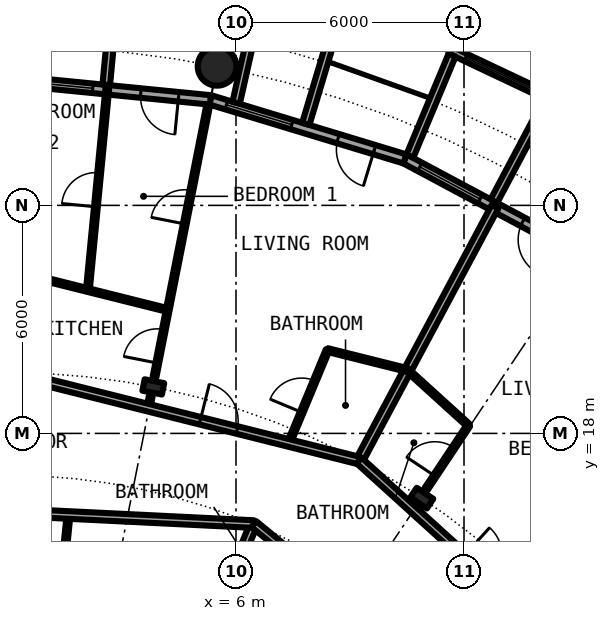
"""IFC4 building model, lengths in metres.
Left out: names, types, materials, properties, quantities, classifications, styles, units other than length and angle.
Written with IfcOpenShell. Run it as: python <this file> out.ifc"""

import sys

from ifc_helpers import new_model, si_unit, direction, frame, frame_2d, origin, origin_2d, place, context, subcontext, project, spatial, rectangle, circle, hollow_circle, i_section, extrude, element, fill, save


model = new_model("IFC4")
c1 = context("Model", 3, precision=1e-05, world=origin(), true_north=direction((0.0, 1.0)))
c2 = subcontext(c1, "Body", "Model", "MODEL_VIEW")
j1 = project(units=[si_unit("LENGTHUNIT", "METRE"), si_unit("PLANEANGLEUNIT", "RADIAN")], contexts=[c1])
p1 = place(None, origin())
s1 = spatial("IfcSite", under=j1, at=p1, CompositionType="ELEMENT")
p2 = place(p1, origin())
s2 = spatial("IfcBuilding", under=s1, at=p2, CompositionType="ELEMENT")
p3 = place(p2, frame((0.0, 0.0, 81.9)))
s3 = spatial("IfcBuildingStorey", under=s2, at=p3, CompositionType="ELEMENT", Elevation=81.9)
p4 = place(p3, frame((5.501, 27.658, 0.0), z_axis=(0.0, 0.0, 1.0), x_axis=(1.0, 0.0, 0.0)))
e1 = element("IfcColumn", 1, at=p4, inside=s3, PredefinedType="COLUMN", context=c2, shape_type="SweptSolid", body=[
    extrude(hollow_circle(Radius=0.508, WallThickness=0.04, at=origin_2d()), origin(), (0.0, 0.0, 1.0), 3.05),
])
for number, where, z_axis, x_axis in (
    (2, (10.889, 16.297, 0.0), (0.0, 0.0, 1.0), (0.556, 0.831, 0.0)),
    (3, (3.824, 19.223, 0.0), (0.0, 0.0, 1.0), (0.195, 0.981, 0.0)),
):
    element("IfcColumn", number, at=place(p3, frame(where, z_axis=z_axis, x_axis=x_axis)), inside=s3, PredefinedType="COLUMN", context=c2, shape_type="SweptSolid", body=[
        extrude(i_section(OverallWidth=0.306, OverallDepth=0.524, WebThickness=0.021, FlangeThickness=0.04, FilletRadius=0.027, at=origin_2d()), origin(), (0.0, 0.0, 1.0), 3.05),
    ])
p5 = place(p3, frame((15.167, 22.699, 0.0), z_axis=(0.0, 0.0, 1.0), x_axis=(-0.881915646801, 0.471407246368, 0.0)))
e4 = element("IfcWall", 4, at=p5, inside=s3, PredefinedType="SOLIDWALL", context=c2, shape_type="SweptSolid", body=[
    extrude(rectangle(XDim=5.352, YDim=0.25, at=frame_2d((2.676, 0.0))), origin(), (0.0, 0.0, 1.0), 2.7),
])
p6 = place(p5, frame((0.841, 0.0, 0.0)))
e5 = element("IfcOpeningElement", 5, at=p6, cuts=e4, PredefinedType="OPENING", context=c2, shape_type="SweptSolid", body=[
    extrude(rectangle(XDim=1.0, YDim=2.2, at=frame_2d((0.5, 1.1))), frame((0.0, 0.135, 0.0), z_axis=(0.0, -1.0, 0.0), x_axis=(1.0, 0.0, 0.0)), (0.0, 0.0, 1.0), 0.27),
])
p7 = place(p5, frame((3.111, 0.0, 0.3)))
e6 = element("IfcOpeningElement", 6, at=p7, cuts=e4, PredefinedType="OPENING", context=c2, shape_type="SweptSolid", body=[
    extrude(rectangle(XDim=1.8, YDim=2.1, at=frame_2d((0.9, 1.05))), frame((0.0, 0.135, 0.0), z_axis=(0.0, -1.0, 0.0), x_axis=(1.0, 0.0, 0.0)), (0.0, 0.0, 1.0), 0.27),
])
p8 = place(p3, frame((14.335, 26.808, -0.03), z_axis=(0.0, 0.0, 1.0), x_axis=(-0.904000060331, 0.427532327342, 0.0)))
e7 = element("IfcWall", 7, at=p8, inside=s3, PredefinedType="SOLIDWALL", context=c2, shape_type="SweptSolid", body=[
    extrude(rectangle(XDim=2.993, YDim=0.2, at=frame_2d((1.497, 0.0))), origin(), (0.0, 0.0, 1.0), 2.73),
])
p9 = place(p8, frame((0.457, 0.0, 0.33)))
e8 = element("IfcOpeningElement", 8, at=p9, cuts=e7, PredefinedType="OPENING", context=c2, shape_type="SweptSolid", body=[
    extrude(circle(Radius=1.04, at=frame_2d((1.04, 1.04))), frame((0.0, 0.11, 0.0), z_axis=(0.0, -1.0, 0.0), x_axis=(1.0, 0.0, 0.0)), (0.0, 0.0, 1.0), 0.22),
])
p10 = place(p3, frame((12.787, 24.113, -0.03), z_axis=(0.0, 0.0, 1.0), x_axis=(0.468365282436, 0.883534924159, 0.0)))
e9 = element("IfcWall", 9, at=p10, inside=s3, PredefinedType="SOLIDWALL", context=c2, shape_type="SweptSolid", body=[
    extrude(rectangle(XDim=3.006, YDim=0.2, at=frame_2d((1.503, 0.0))), origin(), (0.0, 0.0, 1.0), 2.73),
])
p11 = place(p3, frame((10.575, 25.295, -0.03), z_axis=(0.0, 0.0, 1.0), x_axis=(0.385697364644, 0.922625353492, 0.0)))
e10 = element("IfcWall", 10, at=p11, inside=s3, PredefinedType="SOLIDWALL", context=c2, shape_type="SweptSolid", body=[
    extrude(rectangle(XDim=2.883, YDim=0.2, at=frame_2d((1.442, 0.0))), origin(), (0.0, 0.0, 1.0), 2.73),
])
p12 = place(p3, frame((10.447, 25.222, 0.0), z_axis=(0.0, 0.0, 1.0), x_axis=(-0.956965678721, 0.290201119486, 0.0)))
e11 = element("IfcWall", 11, at=p12, inside=s3, PredefinedType="SOLIDWALL", context=c2, shape_type="SweptSolid", body=[
    extrude(rectangle(XDim=5.351, YDim=0.25, at=frame_2d((2.676, 0.0))), origin(), (0.0, 0.0, 1.0), 2.7),
])
p13 = place(p12, frame((0.841, 0.0, 0.0)))
e12 = element("IfcOpeningElement", 12, at=p13, cuts=e11, PredefinedType="OPENING", context=c2, shape_type="SweptSolid", body=[
    extrude(rectangle(XDim=1.0, YDim=2.2, at=frame_2d((0.5, 1.1))), frame((0.0, 0.135, 0.0), z_axis=(0.0, -1.0, 0.0), x_axis=(1.0, 0.0, 0.0)), (0.0, 0.0, 1.0), 0.27),
])
p14 = place(p12, frame((3.111, 0.0, 0.3)))
e13 = element("IfcOpeningElement", 13, at=p14, cuts=e11, PredefinedType="OPENING", context=c2, shape_type="SweptSolid", body=[
    extrude(rectangle(XDim=1.8, YDim=2.1, at=frame_2d((0.9, 1.05))), frame((0.0, 0.135, 0.0), z_axis=(0.0, -1.0, 0.0), x_axis=(1.0, 0.0, 0.0)), (0.0, 0.0, 1.0), 0.27),
])
p15 = place(p3, frame((7.837, 26.144, -0.03), z_axis=(0.0, 0.0, 1.0), x_axis=(0.287064767992, 0.957911174889, 0.0)))
e14 = element("IfcWall", 14, at=p15, inside=s3, PredefinedType="SOLIDWALL", context=c2, shape_type="SweptSolid", body=[
    extrude(rectangle(XDim=3.006, YDim=0.2, at=frame_2d((1.503, 0.0))), origin(), (0.0, 0.0, 1.0), 2.73),
])
p16 = place(p3, frame((6.004, 26.7, -0.03), z_axis=(0.0, 0.0, 1.0), x_axis=(0.219609259383, 0.975587911566, 0.0)))
e15 = element("IfcWall", 15, at=p16, inside=s3, PredefinedType="SOLIDWALL", context=c2, shape_type="SweptSolid", body=[
    extrude(rectangle(XDim=2.933, YDim=0.2, at=frame_2d((1.466, 0.0))), origin(), (0.0, 0.0, 1.0), 2.73),
])
p17 = place(p3, frame((5.326, 26.775, 0.0), z_axis=(0.0, 0.0, 1.0), x_axis=(-0.995173996315, 0.098126026407, 0.0)))
e16 = element("IfcWall", 16, at=p17, inside=s3, PredefinedType="SOLIDWALL", context=c2, shape_type="SweptSolid", body=[
    extrude(rectangle(XDim=5.352, YDim=0.25, at=frame_2d((2.676, 0.0))), origin(), (0.0, 0.0, 1.0), 2.7),
])
p18 = place(p17, frame((0.841, 0.0, 0.0)))
e17 = element("IfcOpeningElement", 17, at=p18, cuts=e16, PredefinedType="OPENING", context=c2, shape_type="SweptSolid", body=[
    extrude(rectangle(XDim=1.0, YDim=2.2, at=frame_2d((0.5, 1.1))), frame((0.0, 0.135, 0.0), z_axis=(0.0, -1.0, 0.0), x_axis=(1.0, 0.0, 0.0)), (0.0, 0.0, 1.0), 0.27),
])
p19 = place(p17, frame((3.111, 0.0, 0.3)))
e18 = element("IfcOpeningElement", 18, at=p19, cuts=e16, PredefinedType="OPENING", context=c2, shape_type="SweptSolid", body=[
    extrude(rectangle(XDim=1.8, YDim=2.1, at=frame_2d((0.9, 1.05))), frame((0.0, 0.135, 0.0), z_axis=(0.0, -1.0, 0.0), x_axis=(1.0, 0.0, 0.0)), (0.0, 0.0, 1.0), 0.27),
])
p20 = place(p3, frame((2.586, 27.171, -0.03), z_axis=(0.0, 0.0, 1.0), x_axis=(0.094548432284, 0.995520262954, 0.0)))
e19 = element("IfcWall", 19, at=p20, inside=s3, PredefinedType="SOLIDWALL", context=c2, shape_type="SweptSolid", body=[
    extrude(rectangle(XDim=3.006, YDim=0.2, at=frame_2d((1.503, 0.0))), origin(), (0.0, 0.0, 1.0), 2.73),
])
p21 = place(p3, frame((0.774, 7.681, 0.0), z_axis=(0.0, 0.0, 1.0), x_axis=(0.099730339513, 0.995014502096, 0.0)))
e20 = element("IfcWall", 20, at=p21, inside=s3, PredefinedType="PARTITIONING", context=c2, shape_type="SweptSolid", body=[
    extrude(rectangle(XDim=8.213, YDim=0.1, at=frame_2d((4.106, 0.0))), origin(), (0.0, 0.0, 1.0), 2.7),
])
p22 = place(p21, frame((6.49, 0.0, 0.0)))
e21 = element("IfcOpeningElement", 21, at=p22, cuts=e20, PredefinedType="OPENING", context=c2, shape_type="SweptSolid", body=[
    extrude(rectangle(XDim=0.9, YDim=2.3, at=frame_2d((0.45, 1.15))), frame((0.0, 0.06, 0.0), z_axis=(0.0, -1.0, 0.0), x_axis=(1.0, 0.0, 0.0)), (0.0, 0.0, 1.0), 0.12),
])
p23 = place(p21, frame((2.384, 0.0, 0.0)))
e22 = element("IfcOpeningElement", 22, at=p23, cuts=e20, PredefinedType="OPENING", context=c2, shape_type="SweptSolid", body=[
    extrude(rectangle(XDim=0.9, YDim=2.3, at=frame_2d((0.45, 1.15))), frame((0.0, 0.06, 0.0), z_axis=(0.0, -1.0, 0.0), x_axis=(1.0, 0.0, 0.0)), (0.0, 0.0, 1.0), 0.12),
])
p24 = place(p3, frame((2.102, 21.773, 0.0), z_axis=(0.0, 0.0, 1.0), x_axis=(0.096215269366, 0.995360548716, 0.0)))
e23 = element("IfcWall", 23, at=p24, inside=s3, PredefinedType="PARTITIONING", context=c2, shape_type="SweptSolid", body=[
    extrude(rectangle(XDim=5.301, YDim=0.1, at=frame_2d((2.65, 0.0))), origin(), (0.0, 0.0, 1.0), 2.7),
])
p25 = place(p24, frame((2.2, 0.0, 0.0)))
e24 = element("IfcOpeningElement", 24, at=p25, cuts=e23, PredefinedType="OPENING", context=c2, shape_type="SweptSolid", body=[
    extrude(rectangle(XDim=0.9, YDim=2.3, at=frame_2d((0.45, 1.15))), frame((0.0, 0.06, 0.0), z_axis=(0.0, -1.0, 0.0), x_axis=(1.0, 0.0, 0.0)), (0.0, 0.0, 1.0), 0.12),
])
p26 = place(p3, frame((2.955, 7.132, 0.0), z_axis=(0.0, 0.0, 1.0), x_axis=(0.382556139466, 0.923932248683, 0.0)))
e25 = element("IfcWall", 25, at=p26, inside=s3, PredefinedType="PARTITIONING", context=c2, shape_type="SweptSolid", body=[
    extrude(rectangle(XDim=9.18, YDim=0.2, at=frame_2d((4.59, 0.0))), origin(), (0.0, 0.0, 1.0), 2.7),
])
p27 = place(p3, frame((3.696, 18.674, 0.0), z_axis=(0.0, 0.0, 1.0), x_axis=(0.19502665362, 0.980797942686, 0.0)))
e26 = element("IfcWall", 26, at=p27, inside=s3, PredefinedType="PARTITIONING", context=c2, shape_type="SweptSolid", body=[
    extrude(rectangle(XDim=0.302, YDim=0.1, at=frame_2d((0.151, 0.0))), origin(), (0.0, 0.0, 1.0), 2.7),
])
p28 = place(p3, frame((3.856, 19.484, 0.0), z_axis=(0.0, 0.0, 1.0), x_axis=(0.193900661819, 0.981021168654, 0.0)))
e27 = element("IfcWall", 27, at=p28, inside=s3, PredefinedType="PARTITIONING", context=c2, shape_type="SweptSolid", body=[
    extrude(rectangle(XDim=7.313, YDim=0.1, at=frame_2d((3.656, 0.0))), origin(), (0.0, 0.0, 1.0), 2.7),
])
p29 = place(p28, frame((0.374, 0.0, 0.0)))
e28 = element("IfcOpeningElement", 28, at=p29, cuts=e27, PredefinedType="OPENING", context=c2, shape_type="SweptSolid", body=[
    extrude(rectangle(XDim=0.9, YDim=2.3, at=frame_2d((0.45, 1.15))), frame((0.0, 0.06, 0.0), z_axis=(0.0, -1.0, 0.0), x_axis=(1.0, 0.0, 0.0)), (0.0, 0.0, 1.0), 0.12),
])
p30 = place(p28, frame((4.105, 0.0, 0.0)))
e29 = element("IfcOpeningElement", 29, at=p30, cuts=e27, PredefinedType="OPENING", context=c2, shape_type="SweptSolid", body=[
    extrude(rectangle(XDim=0.9, YDim=2.3, at=frame_2d((0.45, 1.15))), frame((0.0, 0.06, 0.0), z_axis=(0.0, -1.0, 0.0), x_axis=(1.0, 0.0, 0.0)), (0.0, 0.0, 1.0), 0.12),
])
p31 = place(p3, frame((7.392, 17.749, 0.0), z_axis=(0.0, 0.0, 1.0), x_axis=(0.384438589316, 0.923150567917, 0.0)))
e30 = element("IfcWall", 30, at=p31, inside=s3, PredefinedType="PARTITIONING", context=c2, shape_type="SweptSolid", body=[
    extrude(rectangle(XDim=2.647, YDim=0.1, at=frame_2d((1.324, 0.0))), origin(), (0.0, 0.0, 1.0), 2.7),
])
p32 = place(p31, frame((0.874, 0.0, 0.0)))
e31 = element("IfcOpeningElement", 31, at=p32, cuts=e30, PredefinedType="OPENING", context=c2, shape_type="SweptSolid", body=[
    extrude(rectangle(XDim=0.9, YDim=2.3, at=frame_2d((0.45, 1.15))), frame((0.0, 0.06, 0.0), z_axis=(0.0, -1.0, 0.0), x_axis=(1.0, 0.0, 0.0)), (0.0, 0.0, 1.0), 0.12),
])
p33 = place(p3, frame((9.244, 17.284, 0.0), z_axis=(0.0, 0.0, 1.0), x_axis=(0.471506520577, 0.881862574925, 0.0)))
e32 = element("IfcWall", 32, at=p33, inside=s3, PredefinedType="PARTITIONING", context=c2, shape_type="SweptSolid", body=[
    extrude(rectangle(XDim=7.574, YDim=0.2, at=frame_2d((3.787, 0.0))), origin(), (0.0, 0.0, 1.0), 2.7),
])
p34 = place(p3, frame((11.003, 16.536, 0.0), z_axis=(0.0, 0.0, 1.0), x_axis=(0.554112076035, 0.832442074376, 0.0)))
e33 = element("IfcWall", 33, at=p34, inside=s3, PredefinedType="PARTITIONING", context=c2, shape_type="SweptSolid", body=[
    extrude(rectangle(XDim=2.012, YDim=0.1, at=frame_2d((1.006, 0.0))), origin(), (0.0, 0.0, 1.0), 2.7),
])
p35 = place(p34, frame((0.414, 0.0, 0.0)))
e34 = element("IfcOpeningElement", 34, at=p35, cuts=e33, PredefinedType="OPENING", context=c2, shape_type="SweptSolid", body=[
    extrude(rectangle(XDim=0.9, YDim=2.3, at=frame_2d((0.45, 1.15))), frame((0.0, 0.06, 0.0), z_axis=(0.0, -1.0, 0.0), x_axis=(1.0, 0.0, 0.0)), (0.0, 0.0, 1.0), 0.12),
])
p36 = place(p3, frame((13.474, 13.448, 0.0), z_axis=(0.0, 0.0, 1.0), x_axis=(0.707766479207, 0.706446467123, 0.0)))
e35 = element("IfcWall", 35, at=p36, inside=s3, PredefinedType="PARTITIONING", context=c2, shape_type="SweptSolid", body=[
    extrude(rectangle(XDim=8.138, YDim=0.1, at=frame_2d((4.069, 0.0))), origin(), (0.0, 0.0, 1.0), 2.7),
])
p37 = place(p36, frame((0.861, 0.0, 0.0)))
e36 = element("IfcOpeningElement", 36, at=p37, cuts=e35, PredefinedType="OPENING", context=c2, shape_type="SweptSolid", body=[
    extrude(rectangle(XDim=0.9, YDim=2.3, at=frame_2d((0.45, 1.15))), frame((0.0, 0.06, 0.0), z_axis=(0.0, -1.0, 0.0), x_axis=(1.0, 0.0, 0.0)), (0.0, 0.0, 1.0), 0.12),
])
p38 = place(p36, frame((4.931, 0.0, 0.0)))
e37 = element("IfcOpeningElement", 37, at=p38, cuts=e35, PredefinedType="OPENING", context=c2, shape_type="SweptSolid", body=[
    extrude(rectangle(XDim=0.9, YDim=2.3, at=frame_2d((0.45, 1.15))), frame((0.0, 0.06, 0.0), z_axis=(0.0, -1.0, 0.0), x_axis=(1.0, 0.0, 0.0)), (0.0, 0.0, 1.0), 0.12),
])
p39 = place(p3, frame((-4.903, 16.172, 0.0), z_axis=(0.0, 0.0, 1.0), x_axis=(0.998797695979, -0.049022061427, 0.0)))
e38 = element("IfcWall", 38, at=p39, inside=s3, PredefinedType="PARTITIONING", context=c2, shape_type="SweptSolid", body=[
    extrude(rectangle(XDim=11.385, YDim=0.2, at=frame_2d((5.692, 0.0))), origin(), (0.0, 0.0, 1.0), 2.7),
])
p40 = place(p39, frame((4.376, 0.0, 0.0)))
e39 = element("IfcOpeningElement", 39, at=p40, cuts=e38, PredefinedType="OPENING", context=c2, shape_type="SweptSolid", body=[
    extrude(rectangle(XDim=1.0, YDim=2.3, at=frame_2d((0.5, 1.15))), frame((0.0, 0.11, 0.0), z_axis=(0.0, -1.0, 0.0), x_axis=(1.0, 0.0, 0.0)), (0.0, 0.0, 1.0), 0.22),
])
p41 = place(p3, frame((6.47, 15.613, 0.0), z_axis=(0.0, 0.0, 1.0), x_axis=(0.77292501819, -0.634497372931, 0.0)))
e40 = element("IfcWall", 40, at=p41, inside=s3, PredefinedType="PARTITIONING", context=c2, shape_type="SweptSolid", body=[
    extrude(rectangle(XDim=9.81, YDim=0.2, at=frame_2d((4.905, 0.0))), origin(), (0.0, 0.0, 1.0), 2.7),
])
p42 = place(p41, frame((4.404, 0.0, 0.0)))
e41 = element("IfcOpeningElement", 41, at=p42, cuts=e40, PredefinedType="OPENING", context=c2, shape_type="SweptSolid", body=[
    extrude(rectangle(XDim=1.0, YDim=2.3, at=frame_2d((0.5, 1.15))), frame((0.0, 0.11, 0.0), z_axis=(0.0, -1.0, 0.0), x_axis=(1.0, 0.0, 0.0)), (0.0, 0.0, 1.0), 0.22),
])
p43 = place(p3, frame((0.0, 19.6, 0.0), z_axis=(0.0, 0.0, 1.0), x_axis=(0.970008158324, -0.243072361213, 0.0)))
e42 = element("IfcWall", 42, at=p43, inside=s3, PredefinedType="PARTITIONING", context=c2, shape_type="SweptSolid", body=[
    extrude(rectangle(XDim=9.525, YDim=0.2, at=frame_2d((4.762, 0.0))), origin(), (0.0, 0.0, 1.0), 2.38),
])
p44 = place(p43, frame((5.213, 0.0, 0.0)))
e43 = element("IfcOpeningElement", 43, at=p44, cuts=e42, PredefinedType="OPENING", context=c2, shape_type="SweptSolid", body=[
    extrude(rectangle(XDim=1.0, YDim=2.3, at=frame_2d((0.5, 1.15))), frame((0.0, 0.11, 0.0), z_axis=(0.0, -1.0, 0.0), x_axis=(1.0, 0.0, 0.0)), (0.0, 0.0, 1.0), 0.22),
])
p45 = place(p3, frame((9.239, 17.286, 0.0), z_axis=(0.0, 0.0, 1.0), x_axis=(0.740909940942, -0.671604392044, 0.0)))
e44 = element("IfcWall", 44, at=p45, inside=s3, PredefinedType="PARTITIONING", context=c2, shape_type="SweptSolid", body=[
    extrude(rectangle(XDim=9.367, YDim=0.2, at=frame_2d((4.683, 0.0))), origin(), (0.0, 0.0, 1.0), 2.38),
])
p46 = place(p45, frame((3.731, 0.0, 0.0)))
e45 = element("IfcOpeningElement", 45, at=p46, cuts=e44, PredefinedType="OPENING", context=c2, shape_type="SweptSolid", body=[
    extrude(rectangle(XDim=1.0, YDim=2.3, at=frame_2d((0.5, 1.15))), frame((0.0, 0.11, 0.0), z_axis=(0.0, -1.0, 0.0), x_axis=(1.0, 0.0, 0.0)), (0.0, 0.0, 1.0), 0.22),
])
p47 = place(p3, frame((-0.01, 22.3, 0.0), z_axis=(0.0, 0.0, 1.0), x_axis=(0.970106148391, -0.24268098577, 0.0)))
e46 = element("IfcWall", 46, at=p47, inside=s3, PredefinedType="PARTITIONING", context=c2, shape_type="SweptSolid", body=[
    extrude(rectangle(XDim=4.347, YDim=0.1, at=frame_2d((2.173, 0.0))), origin(), (0.0, 0.0, 1.0), 2.7),
])
p48 = place(p3, frame((8.41, 20.193, 0.0), z_axis=(0.0, 0.0, 1.0), x_axis=(0.970076188308, -0.242800718444, 0.0)))
e47 = element("IfcWall", 47, at=p48, inside=s3, PredefinedType="PARTITIONING", context=c2, shape_type="SweptSolid", body=[
    extrude(rectangle(XDim=2.167, YDim=0.1, at=frame_2d((1.083, 0.0))), origin(), (0.0, 0.0, 1.0), 2.7),
])
p49 = place(p3, frame((10.512, 19.667, 0.0), z_axis=(0.0, 0.0, 1.0), x_axis=(0.740836325503, -0.671685595212, 0.0)))
e48 = element("IfcWall", 48, at=p49, inside=s3, PredefinedType="PARTITIONING", context=c2, shape_type="SweptSolid", body=[
    extrude(rectangle(XDim=2.168, YDim=0.1, at=frame_2d((1.084, 0.0))), origin(), (0.0, 0.0, 1.0), 2.7),
])
p50 = place(p6, origin())
e49 = element("IfcDoor", 49, at=p50, inside=s3, OperationType="SINGLE_SWING_LEFT", PredefinedType="DOOR", context=c2, shape_type="SweptSolid", body=[
    extrude(rectangle(XDim=1.0, YDim=2.2, at=frame_2d((0.5, 1.1))), frame((0.0, 0.025, 0.0), z_axis=(0.0, -1.0, 0.0), x_axis=(1.0, 0.0, 0.0)), (0.0, 0.0, 1.0), 0.05),
])
fill(e5, e49)
p51 = place(p7, origin())
e50 = element("IfcWindow", 50, at=p51, inside=s3, PartitioningType="SINGLE_PANEL", PredefinedType="WINDOW", context=c2, shape_type="SweptSolid", body=[
    extrude(rectangle(XDim=1.8, YDim=2.1, at=frame_2d((0.9, 1.05))), frame((0.0, 0.03, 0.0), z_axis=(0.0, -1.0, 0.0), x_axis=(1.0, 0.0, 0.0)), (0.0, 0.0, 1.0), 0.06),
])
fill(e6, e50)
p52 = place(p9, origin())
e51 = element("IfcWindow", 51, at=p52, inside=s3, PartitioningType="SINGLE_PANEL", PredefinedType="WINDOW", context=c2, shape_type="SweptSolid", body=[
    extrude(circle(Radius=1.04, at=frame_2d((1.04, 1.04))), frame((0.0, 0.03, 0.0), z_axis=(0.0, -1.0, 0.0), x_axis=(1.0, 0.0, 0.0)), (0.0, 0.0, 1.0), 0.06),
])
fill(e8, e51)
p53 = place(p13, origin())
e52 = element("IfcDoor", 52, at=p53, inside=s3, OperationType="SINGLE_SWING_LEFT", PredefinedType="DOOR", context=c2, shape_type="SweptSolid", body=[
    extrude(rectangle(XDim=1.0, YDim=2.2, at=frame_2d((0.5, 1.1))), frame((0.0, 0.025, 0.0), z_axis=(0.0, -1.0, 0.0), x_axis=(1.0, 0.0, 0.0)), (0.0, 0.0, 1.0), 0.05),
])
fill(e12, e52)
p54 = place(p14, origin())
e53 = element("IfcWindow", 53, at=p54, inside=s3, PartitioningType="SINGLE_PANEL", PredefinedType="WINDOW", context=c2, shape_type="SweptSolid", body=[
    extrude(rectangle(XDim=1.8, YDim=2.1, at=frame_2d((0.9, 1.05))), frame((0.0, 0.03, 0.0), z_axis=(0.0, -1.0, 0.0), x_axis=(1.0, 0.0, 0.0)), (0.0, 0.0, 1.0), 0.06),
])
fill(e13, e53)
p55 = place(p18, origin())
e54 = element("IfcDoor", 54, at=p55, inside=s3, OperationType="SINGLE_SWING_LEFT", PredefinedType="DOOR", context=c2, shape_type="SweptSolid", body=[
    extrude(rectangle(XDim=1.0, YDim=2.2, at=frame_2d((0.5, 1.1))), frame((0.0, 0.025, 0.0), z_axis=(0.0, -1.0, 0.0), x_axis=(1.0, 0.0, 0.0)), (0.0, 0.0, 1.0), 0.05),
])
fill(e17, e54)
p56 = place(p19, origin())
e55 = element("IfcWindow", 55, at=p56, inside=s3, PartitioningType="SINGLE_PANEL", PredefinedType="WINDOW", context=c2, shape_type="SweptSolid", body=[
    extrude(rectangle(XDim=1.8, YDim=2.1, at=frame_2d((0.9, 1.05))), frame((0.0, 0.03, 0.0), z_axis=(0.0, -1.0, 0.0), x_axis=(1.0, 0.0, 0.0)), (0.0, 0.0, 1.0), 0.06),
])
fill(e18, e55)
p57 = place(p35, origin())
e56 = element("IfcDoor", 56, at=p57, inside=s3, OperationType="SINGLE_SWING_LEFT", PredefinedType="DOOR", context=c2, shape_type="SweptSolid", body=[
    extrude(rectangle(XDim=0.9, YDim=2.3, at=frame_2d((0.45, 1.15))), frame((0.0, 0.025, 0.0), z_axis=(0.0, -1.0, 0.0), x_axis=(1.0, 0.0, 0.0)), (0.0, 0.0, 1.0), 0.05),
])
fill(e34, e56)
p58 = place(p44, origin())
e57 = element("IfcDoor", 57, at=p58, inside=s3, OperationType="SINGLE_SWING_RIGHT", PredefinedType="DOOR", context=c2, shape_type="SweptSolid", body=[
    extrude(rectangle(XDim=1.0, YDim=2.3, at=frame_2d((0.5, 1.15))), frame((0.0, 0.025, 0.0), z_axis=(0.0, -1.0, 0.0), x_axis=(1.0, 0.0, 0.0)), (0.0, 0.0, 1.0), 0.05),
])
fill(e43, e57)
p59 = place(p32, origin())
e58 = element("IfcDoor", 58, at=p59, inside=s3, OperationType="SINGLE_SWING_RIGHT", PredefinedType="DOOR", context=c2, shape_type="SweptSolid", body=[
    extrude(rectangle(XDim=0.9, YDim=2.3, at=frame_2d((0.45, 1.15))), frame((0.0, 0.025, 0.0), z_axis=(0.0, -1.0, 0.0), x_axis=(1.0, 0.0, 0.0)), (0.0, 0.0, 1.0), 0.05),
])
fill(e31, e58)
p60 = place(p29, origin())
e59 = element("IfcDoor", 59, at=p60, inside=s3, OperationType="SINGLE_SWING_LEFT", PredefinedType="DOOR", context=c2, shape_type="SweptSolid", body=[
    extrude(rectangle(XDim=0.9, YDim=2.3, at=frame_2d((0.45, 1.15))), frame((0.0, 0.025, 0.0), z_axis=(0.0, -1.0, 0.0), x_axis=(1.0, 0.0, 0.0)), (0.0, 0.0, 1.0), 0.05),
])
fill(e28, e59)
p61 = place(p30, origin())
e60 = element("IfcDoor", 60, at=p61, inside=s3, OperationType="SINGLE_SWING_RIGHT", PredefinedType="DOOR", context=c2, shape_type="SweptSolid", body=[
    extrude(rectangle(XDim=0.9, YDim=2.3, at=frame_2d((0.45, 1.15))), frame((0.0, 0.025, 0.0), z_axis=(0.0, -1.0, 0.0), x_axis=(1.0, 0.0, 0.0)), (0.0, 0.0, 1.0), 0.05),
])
fill(e29, e60)
p62 = place(p25, origin())
e61 = element("IfcDoor", 61, at=p62, inside=s3, OperationType="SINGLE_SWING_RIGHT", PredefinedType="DOOR", context=c2, shape_type="SweptSolid", body=[
    extrude(rectangle(XDim=0.9, YDim=2.3, at=frame_2d((0.45, 1.15))), frame((0.0, 0.025, 0.0), z_axis=(0.0, -1.0, 0.0), x_axis=(1.0, 0.0, 0.0)), (0.0, 0.0, 1.0), 0.05),
])
fill(e24, e61)
save(model, sys.argv[1])
